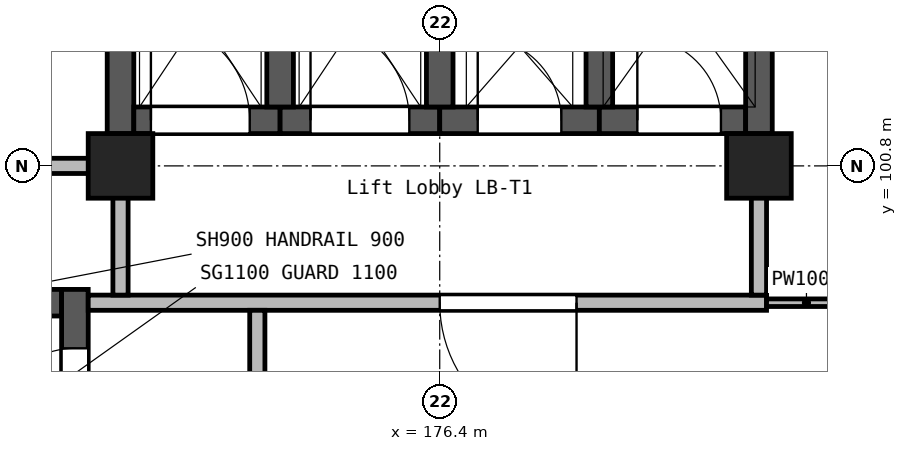
"""IFC4 building model, lengths in metres.
Left out: names, types, materials, properties, quantities, classifications, styles, units other than length and angle.
Written with IfcOpenShell. Run it as: python <this file> out.ifc"""

import sys

from ifc_helpers import new_model, si_unit, direction, frame, frame_2d, origin, origin_2d, place, context, subcontext, project, spatial, rectangle, extrude, element, fill, save


model = new_model("IFC4")
c1 = context("Model", 3, precision=1e-05, world=origin(), true_north=direction((0.0, 1.0)))
c2 = subcontext(c1, "Body", "Model", "MODEL_VIEW")
j1 = project(units=[si_unit("LENGTHUNIT", "METRE"), si_unit("PLANEANGLEUNIT", "RADIAN")], contexts=[c1])
p1 = place(None, origin())
s1 = spatial("IfcSite", under=j1, at=p1, CompositionType="ELEMENT")
p2 = place(p1, origin())
s2 = spatial("IfcBuilding", under=s1, at=p2, CompositionType="ELEMENT")
p3 = place(p2, origin())
s3 = spatial("IfcBuildingStorey", under=s2, at=p3, CompositionType="ELEMENT", Elevation=0.0)
for number, where, z_axis, x_axis in (
    (1, (172.2, 100.8, -0.3), (0.0, 0.0, 1.0), (1.0, 0.0, 0.0)),
    (2, (180.6, 100.8, -0.3), (0.0, 0.0, 1.0), (1.0, 0.0, 0.0)),
):
    element("IfcColumn", number, at=place(p3, frame(where, z_axis=z_axis, x_axis=x_axis)), inside=s3, PredefinedType="COLUMN", context=c2, shape_type="SweptSolid", body=[
        extrude(rectangle(XDim=0.85, YDim=0.85, at=origin_2d()), origin(), (0.0, 0.0, 1.0), 5.7),
    ])
p4 = place(p3, frame((163.625, 99.0, -0.3), z_axis=(0.0, 0.0, 1.0), x_axis=(1.0, 0.0, 0.0)))
e3 = element("IfcWall", 3, at=p4, inside=s3, PredefinedType="SHEAR", context=c2, shape_type="SweptSolid", body=[
    extrude(rectangle(XDim=7.8, YDim=0.35, at=frame_2d((3.9, 0.0))), origin(), (0.0, 0.0, 1.0), 5.7),
])
p5 = place(p3, frame((171.6, 94.025, -0.3), z_axis=(0.0, 0.0, 1.0), x_axis=(0.0, 1.0, 0.0)))
e4 = element("IfcWall", 4, at=p5, inside=s3, PredefinedType="SHEAR", context=c2, shape_type="SweptSolid", body=[
    extrude(rectangle(XDim=5.15, YDim=0.35, at=frame_2d((2.575, 0.0))), origin(), (0.0, 0.0, 1.0), 5.7),
])
p6 = place(p5, frame((3.275, 0.0, 0.3)))
e5 = element("IfcOpeningElement", 5, at=p6, cuts=e4, PredefinedType="OPENING", context=c2, shape_type="SweptSolid", body=[
    extrude(rectangle(XDim=1.1, YDim=2.1, at=frame_2d((0.55, 1.05))), frame((0.0, 0.185, 0.0), z_axis=(0.0, -1.0, 0.0), x_axis=(1.0, 0.0, 0.0)), (0.0, 0.0, 1.0), 0.37),
])
p7 = place(p3, frame((172.2, 101.225, -0.3), z_axis=(0.0, 0.0, 1.0), x_axis=(0.0, 1.0, 0.0)))
e6 = element("IfcWall", 6, at=p7, inside=s3, PredefinedType="SHEAR", context=c2, shape_type="SweptSolid", body=[
    extrude(rectangle(XDim=5.4, YDim=0.35, at=frame_2d((2.7, 0.0))), origin(), (0.0, 0.0, 1.0), 5.7),
])
p8 = place(p3, frame((172.375, 101.4, -0.3), z_axis=(0.0, 0.0, 1.0), x_axis=(1.0, 0.0, 0.0)))
e7 = element("IfcWall", 7, at=p8, inside=s3, PredefinedType="SHEAR", context=c2, shape_type="SweptSolid", body=[
    extrude(rectangle(XDim=1.925, YDim=0.35, at=frame_2d((0.962, 0.0))), origin(), (0.0, 0.0, 1.0), 5.7),
])
p9 = place(p8, frame((0.225, 0.0, 0.3)))
e8 = element("IfcOpeningElement", 8, at=p9, cuts=e7, PredefinedType="OPENING", context=c2, shape_type="SweptSolid", body=[
    extrude(rectangle(XDim=1.3, YDim=2.1, at=frame_2d((0.65, 1.05))), frame((0.0, 0.185, 0.0), z_axis=(0.0, -1.0, 0.0), x_axis=(1.0, 0.0, 0.0)), (0.0, 0.0, 1.0), 0.37),
])
p10 = place(p3, frame((174.3, 101.4, -0.3), z_axis=(0.0, 0.0, 1.0), x_axis=(1.0, 0.0, 0.0)))
e9 = element("IfcWall", 9, at=p10, inside=s3, PredefinedType="SHEAR", context=c2, shape_type="SweptSolid", body=[
    extrude(rectangle(XDim=2.1, YDim=0.35, at=frame_2d((1.05, 0.0))), origin(), (0.0, 0.0, 1.0), 5.7),
])
p11 = place(p10, frame((0.4, 0.0, 0.3)))
e10 = element("IfcOpeningElement", 10, at=p11, cuts=e9, PredefinedType="OPENING", context=c2, shape_type="SweptSolid", body=[
    extrude(rectangle(XDim=1.3, YDim=2.1, at=frame_2d((0.65, 1.05))), frame((0.0, 0.185, 0.0), z_axis=(0.0, -1.0, 0.0), x_axis=(1.0, 0.0, 0.0)), (0.0, 0.0, 1.0), 0.37),
])
p12 = place(p3, frame((174.3, 101.575, -0.3), z_axis=(0.0, 0.0, 1.0), x_axis=(0.0, 1.0, 0.0)))
e11 = element("IfcWall", 11, at=p12, inside=s3, PredefinedType="SHEAR", context=c2, shape_type="SweptSolid", body=[
    extrude(rectangle(XDim=5.05, YDim=0.35, at=frame_2d((2.525, 0.0))), origin(), (0.0, 0.0, 1.0), 5.7),
])
p13 = place(p3, frame((176.4, 101.4, -0.3), z_axis=(0.0, 0.0, 1.0), x_axis=(1.0, 0.0, 0.0)))
e12 = element("IfcWall", 12, at=p13, inside=s3, PredefinedType="SHEAR", context=c2, shape_type="SweptSolid", body=[
    extrude(rectangle(XDim=2.1, YDim=0.35, at=frame_2d((1.05, 0.0))), origin(), (0.0, 0.0, 1.0), 5.7),
])
p14 = place(p13, frame((0.5, 0.0, 0.3)))
e13 = element("IfcOpeningElement", 13, at=p14, cuts=e12, PredefinedType="OPENING", context=c2, shape_type="SweptSolid", body=[
    extrude(rectangle(XDim=1.1, YDim=2.1, at=frame_2d((0.55, 1.05))), frame((0.0, 0.185, 0.0), z_axis=(0.0, -1.0, 0.0), x_axis=(1.0, 0.0, 0.0)), (0.0, 0.0, 1.0), 0.37),
])
p15 = place(p3, frame((176.4, 101.575, -0.3), z_axis=(0.0, 0.0, 1.0), x_axis=(0.0, 1.0, 0.0)))
e14 = element("IfcWall", 14, at=p15, inside=s3, PredefinedType="SHEAR", context=c2, shape_type="SweptSolid", body=[
    extrude(rectangle(XDim=5.05, YDim=0.35, at=frame_2d((2.525, 0.0))), origin(), (0.0, 0.0, 1.0), 5.7),
])
p16 = place(p3, frame((178.5, 101.4, -0.3), z_axis=(0.0, 0.0, 1.0), x_axis=(1.0, 0.0, 0.0)))
e15 = element("IfcWall", 15, at=p16, inside=s3, PredefinedType="SHEAR", context=c2, shape_type="SweptSolid", body=[
    extrude(rectangle(XDim=1.925, YDim=0.35, at=frame_2d((0.962, 0.0))), origin(), (0.0, 0.0, 1.0), 5.7),
])
p17 = place(p16, frame((0.5, 0.0, 0.3)))
e16 = element("IfcOpeningElement", 16, at=p17, cuts=e15, PredefinedType="OPENING", context=c2, shape_type="SweptSolid", body=[
    extrude(rectangle(XDim=1.1, YDim=2.1, at=frame_2d((0.55, 1.05))), frame((0.0, 0.185, 0.0), z_axis=(0.0, -1.0, 0.0), x_axis=(1.0, 0.0, 0.0)), (0.0, 0.0, 1.0), 0.37),
])
p18 = place(p3, frame((178.5, 101.575, -0.3), z_axis=(0.0, 0.0, 1.0), x_axis=(0.0, 1.0, 0.0)))
e17 = element("IfcWall", 17, at=p18, inside=s3, PredefinedType="SHEAR", context=c2, shape_type="SweptSolid", body=[
    extrude(rectangle(XDim=5.05, YDim=0.35, at=frame_2d((2.525, 0.0))), origin(), (0.0, 0.0, 1.0), 5.7),
])
p19 = place(p3, frame((180.6, 101.225, -0.3), z_axis=(0.0, 0.0, 1.0), x_axis=(0.0, 1.0, 0.0)))
e18 = element("IfcWall", 18, at=p19, inside=s3, PredefinedType="SHEAR", context=c2, shape_type="SweptSolid", body=[
    extrude(rectangle(XDim=5.75, YDim=0.35, at=frame_2d((2.875, 0.0))), origin(), (0.0, 0.0, 1.0), 5.7),
])
p20 = place(p3, frame((180.7, 99.0, 0.0), z_axis=(0.0, 0.0, 1.0), x_axis=(-1.0, 0.0, 0.0)))
e19 = element("IfcWall", 19, at=p20, inside=s3, PredefinedType="SOLIDWALL", context=c2, shape_type="SweptSolid", body=[
    extrude(rectangle(XDim=8.925, YDim=0.2, at=frame_2d((4.462, 0.0))), origin(), (0.0, 0.0, 1.0), 5.05),
])
p21 = place(p20, frame((2.5, 0.0, 0.0)))
e20 = element("IfcOpeningElement", 20, at=p21, cuts=e19, PredefinedType="OPENING", context=c2, shape_type="SweptSolid", body=[
    extrude(rectangle(XDim=1.8, YDim=2.1, at=frame_2d((0.9, 1.05))), frame((0.0, 0.11, 0.0), z_axis=(0.0, -1.0, 0.0), x_axis=(1.0, 0.0, 0.0)), (0.0, 0.0, 1.0), 0.22),
])
p22 = place(p3, frame((172.2, 99.1, 0.0), z_axis=(0.0, 0.0, 1.0), x_axis=(0.0, 1.0, 0.0)))
e21 = element("IfcWall", 21, at=p22, inside=s3, PredefinedType="SOLIDWALL", context=c2, shape_type="SweptSolid", body=[
    extrude(rectangle(XDim=1.3, YDim=0.2, at=frame_2d((0.65, 0.0))), origin(), (0.0, 0.0, 1.0), 5.05),
])
p23 = place(p3, frame((164.6, 100.8, 0.0), z_axis=(0.0, 0.0, 1.0), x_axis=(1.0, 0.0, 0.0)))
e22 = element("IfcWall", 22, at=p23, inside=s3, PredefinedType="SOLIDWALL", context=c2, shape_type="SweptSolid", body=[
    extrude(rectangle(XDim=7.2, YDim=0.2, at=frame_2d((3.6, 0.0))), origin(), (0.0, 0.0, 1.0), 5.05),
])
p24 = place(p23, frame((2.9, 0.0, 0.0)))
e23 = element("IfcOpeningElement", 23, at=p24, cuts=e22, PredefinedType="OPENING", context=c2, shape_type="SweptSolid", body=[
    extrude(rectangle(XDim=1.0, YDim=2.1, at=frame_2d((0.5, 1.05))), frame((0.0, 0.11, 0.0), z_axis=(0.0, -1.0, 0.0), x_axis=(1.0, 0.0, 0.0)), (0.0, 0.0, 1.0), 0.22),
])
p25 = place(p3, frame((174.0, 94.3, 0.0), z_axis=(0.0, 0.0, 1.0), x_axis=(0.0, 1.0, 0.0)))
e24 = element("IfcWall", 24, at=p25, inside=s3, PredefinedType="SOLIDWALL", context=c2, shape_type="SweptSolid", body=[
    extrude(rectangle(XDim=4.6, YDim=0.2, at=frame_2d((2.3, 0.0))), origin(), (0.0, 0.0, 1.0), 5.05),
])
p26 = place(p25, frame((1.75, 0.0, 0.0)))
e25 = element("IfcOpeningElement", 25, at=p26, cuts=e24, PredefinedType="OPENING", context=c2, shape_type="SweptSolid", body=[
    extrude(rectangle(XDim=1.1, YDim=2.1, at=frame_2d((0.55, 1.05))), frame((0.0, 0.11, 0.0), z_axis=(0.0, -1.0, 0.0), x_axis=(1.0, 0.0, 0.0)), (0.0, 0.0, 1.0), 0.22),
])
p27 = place(p3, frame((180.6, 99.1, 0.0), z_axis=(0.0, 0.0, 1.0), x_axis=(0.0, 1.0, 0.0)))
e26 = element("IfcWall", 26, at=p27, inside=s3, PredefinedType="SOLIDWALL", context=c2, shape_type="SweptSolid", body=[
    extrude(rectangle(XDim=1.3, YDim=0.2, at=frame_2d((0.65, 0.0))), origin(), (0.0, 0.0, 1.0), 5.05),
])
p28 = place(p3, frame((180.7, 99.0, 0.0), z_axis=(0.0, 0.0, 1.0), x_axis=(1.0, 0.0, 0.0)))
e27 = element("IfcWall", 27, at=p28, inside=s3, PredefinedType="PARTITIONING", context=c2, shape_type="SweptSolid", body=[
    extrude(rectangle(XDim=1.05, YDim=0.1, at=frame_2d((0.525, 0.0))), origin(), (0.0, 0.0, 1.0), 5.05),
])
p29 = place(p9, origin())
e28 = element("IfcDoor", 28, at=p29, inside=s3, OperationType="DOUBLE_DOOR_SLIDING", PredefinedType="DOOR", context=c2, shape_type="SweptSolid", body=[
    extrude(rectangle(XDim=1.3, YDim=2.1, at=frame_2d((0.65, 1.05))), frame((0.0, 0.025, 0.0), z_axis=(0.0, -1.0, 0.0), x_axis=(1.0, 0.0, 0.0)), (0.0, 0.0, 1.0), 0.05),
])
fill(e8, e28)
p30 = place(p11, origin())
e29 = element("IfcDoor", 29, at=p30, inside=s3, OperationType="DOUBLE_DOOR_SLIDING", PredefinedType="DOOR", context=c2, shape_type="SweptSolid", body=[
    extrude(rectangle(XDim=1.3, YDim=2.1, at=frame_2d((0.65, 1.05))), frame((0.0, 0.025, 0.0), z_axis=(0.0, -1.0, 0.0), x_axis=(1.0, 0.0, 0.0)), (0.0, 0.0, 1.0), 0.05),
])
fill(e10, e29)
p31 = place(p14, origin())
e30 = element("IfcDoor", 30, at=p31, inside=s3, OperationType="DOUBLE_DOOR_SLIDING", PredefinedType="DOOR", context=c2, shape_type="SweptSolid", body=[
    extrude(rectangle(XDim=1.1, YDim=2.1, at=frame_2d((0.55, 1.05))), frame((0.0, 0.025, 0.0), z_axis=(0.0, -1.0, 0.0), x_axis=(1.0, 0.0, 0.0)), (0.0, 0.0, 1.0), 0.05),
])
fill(e13, e30)
p32 = place(p17, origin())
e31 = element("IfcDoor", 31, at=p32, inside=s3, OperationType="DOUBLE_DOOR_SLIDING", PredefinedType="DOOR", context=c2, shape_type="SweptSolid", body=[
    extrude(rectangle(XDim=1.1, YDim=2.1, at=frame_2d((0.55, 1.05))), frame((0.0, 0.025, 0.0), z_axis=(0.0, -1.0, 0.0), x_axis=(1.0, 0.0, 0.0)), (0.0, 0.0, 1.0), 0.05),
])
fill(e16, e31)
p33 = place(p6, origin())
e32 = element("IfcDoor", 32, at=p33, inside=s3, OperationType="SINGLE_SWING_RIGHT", PredefinedType="DOOR", context=c2, shape_type="SweptSolid", body=[
    extrude(rectangle(XDim=1.1, YDim=2.1, at=frame_2d((0.55, 1.05))), frame((0.0, 0.025, 0.0), z_axis=(0.0, -1.0, 0.0), x_axis=(1.0, 0.0, 0.0)), (0.0, 0.0, 1.0), 0.05),
])
fill(e5, e32)
p34 = place(p21, frame((1.8, 0.0, 0.0), z_axis=(0.0, 0.0, 1.0), x_axis=(-1.0, 0.0, 0.0)))
e33 = element("IfcDoor", 33, at=p34, inside=s3, OperationType="DOUBLE_DOOR_SINGLE_SWING", PredefinedType="DOOR", context=c2, shape_type="SweptSolid", body=[
    extrude(rectangle(XDim=1.8, YDim=2.1, at=frame_2d((0.9, 1.05))), frame((0.0, 0.025, 0.0), z_axis=(0.0, -1.0, 0.0), x_axis=(1.0, 0.0, 0.0)), (0.0, 0.0, 1.0), 0.05),
])
fill(e20, e33)
save(model, sys.argv[1])
